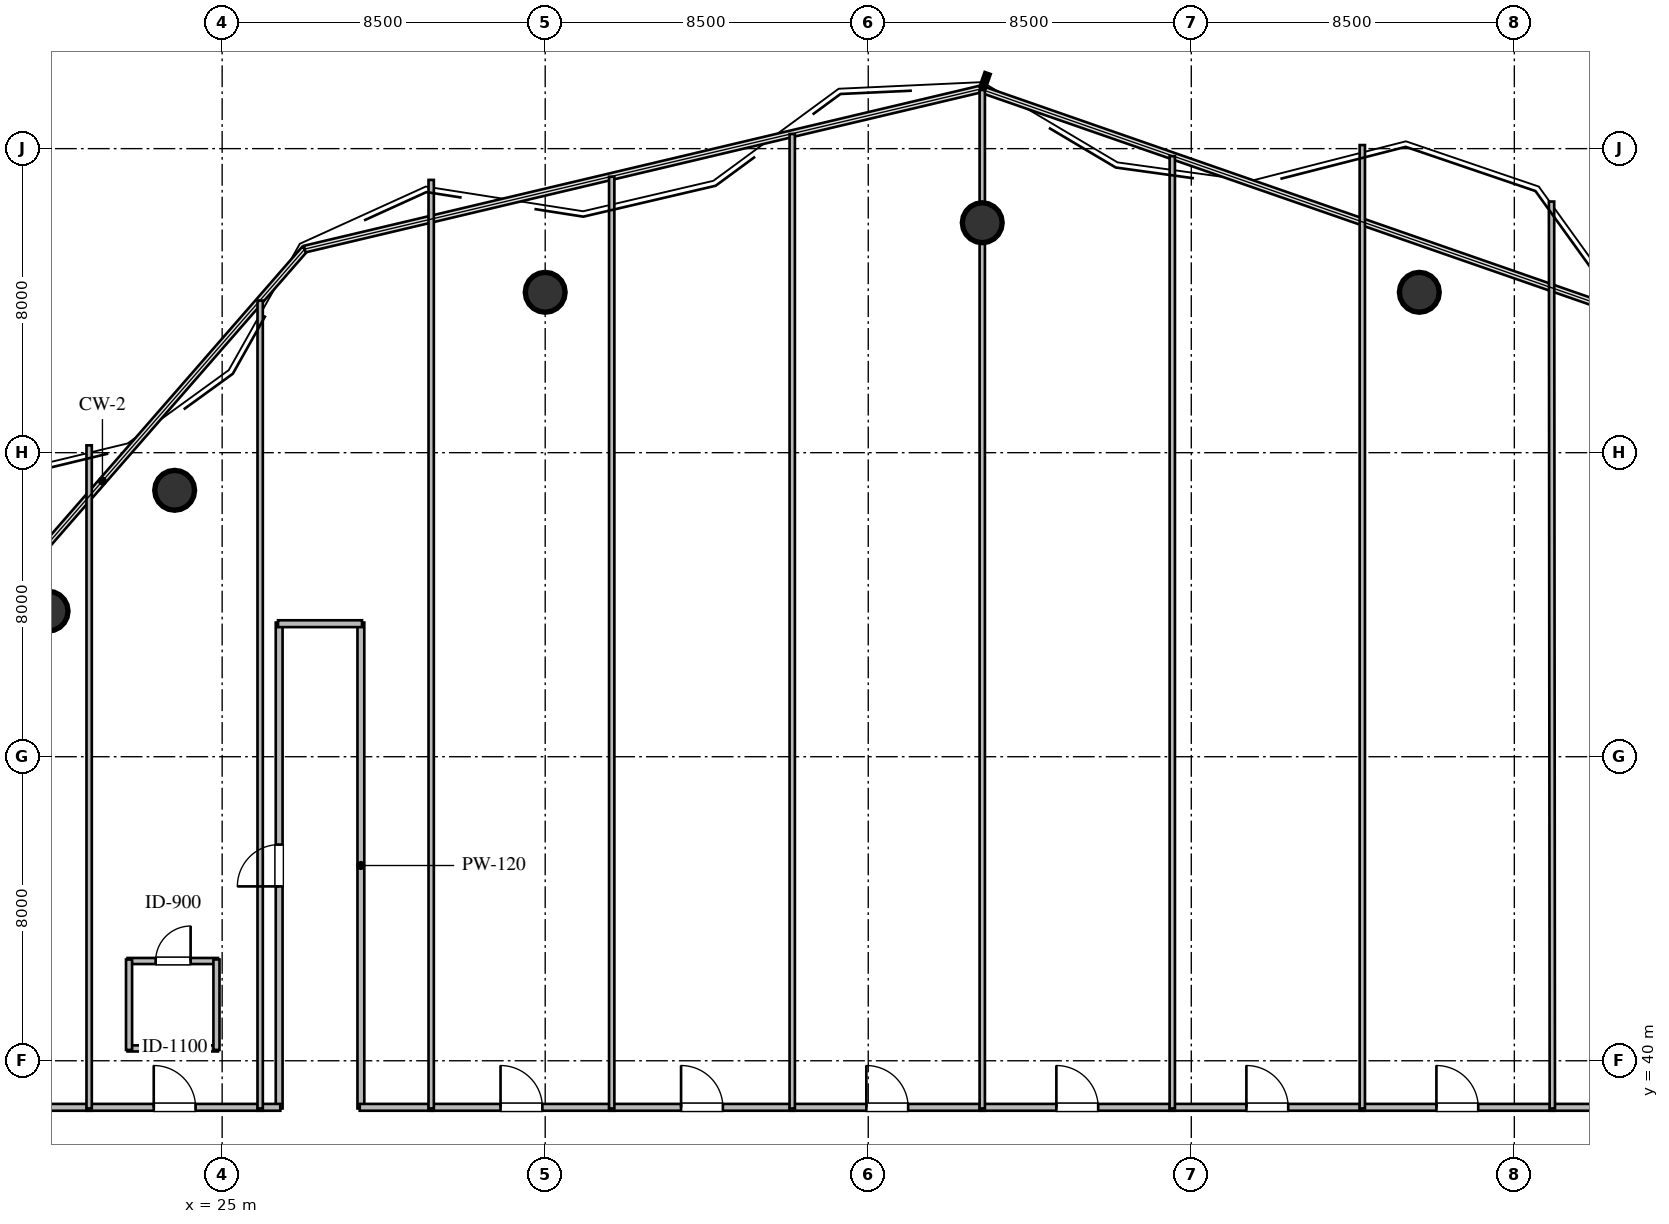
"""IFC4 building model, lengths in metres.
Left out: names, types, materials, properties, quantities, classifications, styles, units other than length and angle.
Written with IfcOpenShell. Run it as: python <this file> out.ifc"""

import sys

from ifc_helpers import new_model, si_unit, direction, frame, frame_2d, origin, origin_2d, place, context, subcontext, project, spatial, rectangle, circle, extrude, element, fill, save


model = new_model("IFC4")
c1 = context("Model", 3, precision=1e-05, world=origin(), true_north=direction((0.0, 1.0)))
c2 = subcontext(c1, "Body", "Model", "MODEL_VIEW")
j1 = project(units=[si_unit("LENGTHUNIT", "METRE"), si_unit("PLANEANGLEUNIT", "RADIAN")], contexts=[c1])
p1 = place(None, origin())
s1 = spatial("IfcSite", under=j1, at=p1, CompositionType="ELEMENT")
p2 = place(p1, origin())
s2 = spatial("IfcBuilding", under=s1, at=p2, CompositionType="ELEMENT")
p3 = place(p2, frame((0.0, 0.0, 249.6)))
s3 = spatial("IfcBuildingStorey", under=s2, at=p3, CompositionType="ELEMENT", Elevation=249.6)
for number, where, z_axis, x_axis in (
    (1, (56.5, 60.22, 0.0), (0.0, 0.0, 1.0), (1.0, 0.0, 0.0)),
    (2, (45.0, 62.05, 0.0), (0.0, 0.0, 1.0), (1.0, 0.0, 0.0)),
    (3, (33.5, 60.22, 0.0), (0.0, 0.0, 1.0), (1.0, 0.0, 0.0)),
    (4, (23.75, 55.01, 0.0), (0.0, 0.0, 1.0), (1.0, 0.0, 0.0)),
    (5, (20.42, 51.83, 0.0), (0.0, 0.0, 1.0), (1.0, 0.0, 0.0)),
):
    element("IfcColumn", number, at=place(p3, frame(where, z_axis=z_axis, x_axis=x_axis)), inside=s3, PredefinedType="COLUMN", context=c2, shape_type="SweptSolid", body=[
        extrude(circle(Radius=0.525, at=origin_2d()), origin(), (0.0, 0.0, 1.0), 3.6),
    ])
p4 = place(p3, frame((22.51, 40.325, 0.0), z_axis=(0.0, 0.0, 1.0), x_axis=(1.0, 0.0, 0.0)))
e6 = element("IfcWall", 6, at=p4, inside=s3, PredefinedType="PLUMBINGWALL", context=c2, shape_type="SweptSolid", body=[
    extrude(rectangle(XDim=2.38, YDim=0.16, at=frame_2d((1.19, 0.0))), origin(), (0.0, 0.0, 1.0), 3.28),
])
p5 = place(p3, frame((22.51, 42.625, 0.0), z_axis=(0.0, 0.0, 1.0), x_axis=(1.0, 0.0, 0.0)))
e7 = element("IfcWall", 7, at=p5, inside=s3, PredefinedType="PLUMBINGWALL", context=c2, shape_type="SweptSolid", body=[
    extrude(rectangle(XDim=2.38, YDim=0.16, at=frame_2d((1.19, 0.0))), origin(), (0.0, 0.0, 1.0), 3.28),
])
p6 = place(p5, frame((0.74, 0.0, 0.0)))
e8 = element("IfcOpeningElement", 8, at=p6, cuts=e7, PredefinedType="OPENING", context=c2, shape_type="SweptSolid", body=[
    extrude(rectangle(XDim=0.92, YDim=2.1, at=frame_2d((0.46, 1.05))), frame((0.0, 0.09, 0.0), z_axis=(0.0, -1.0, 0.0), x_axis=(1.0, 0.0, 0.0)), (0.0, 0.0, 1.0), 0.18),
])
p7 = place(p3, frame((22.55, 40.285, 0.0), z_axis=(0.0, 0.0, 1.0), x_axis=(0.0, 1.0, 0.0)))
e9 = element("IfcWall", 9, at=p7, inside=s3, PredefinedType="PLUMBINGWALL", context=c2, shape_type="SweptSolid", body=[
    extrude(rectangle(XDim=2.38, YDim=0.16, at=frame_2d((1.19, 0.0))), origin(), (0.0, 0.0, 1.0), 2.726),
])
p8 = place(p3, frame((24.85, 40.285, 0.0), z_axis=(0.0, 0.0, 1.0), x_axis=(0.0, 1.0, 0.0)))
e10 = element("IfcWall", 10, at=p8, inside=s3, PredefinedType="PLUMBINGWALL", context=c2, shape_type="SweptSolid", body=[
    extrude(rectangle(XDim=2.38, YDim=0.16, at=frame_2d((1.19, 0.0))), origin(), (0.0, 0.0, 1.0), 3.28),
])
p9 = place(p3, frame((17.405, 38.775, 0.0), z_axis=(0.0, 0.0, 1.0), x_axis=(1.0, 0.0, 0.0)))
e11 = element("IfcWall", 11, at=p9, inside=s3, PredefinedType="PARTITIONING", context=c2, shape_type="SweptSolid", body=[
    extrude(rectangle(XDim=4.16, YDim=0.18, at=frame_2d((2.08, 0.0))), origin(), (0.0, 0.0, 1.0), 3.28),
])
p10 = place(p9, frame((1.53, 0.0, 0.0)))
e12 = element("IfcOpeningElement", 12, at=p10, cuts=e11, PredefinedType="OPENING", context=c2, shape_type="SweptSolid", body=[
    extrude(rectangle(XDim=1.1, YDim=2.1, at=frame_2d((0.55, 1.05))), frame((0.0, 0.1, 0.0), z_axis=(0.0, -1.0, 0.0), x_axis=(1.0, 0.0, 0.0)), (0.0, 0.0, 1.0), 0.2),
])
p11 = place(p3, frame((21.435, 38.775, 0.0), z_axis=(0.0, 0.0, 1.0), x_axis=(1.0, 0.0, 0.0)))
e13 = element("IfcWall", 13, at=p11, inside=s3, PredefinedType="PARTITIONING", context=c2, shape_type="SweptSolid", body=[
    extrude(rectangle(XDim=4.63, YDim=0.18, at=frame_2d((2.315, 0.0))), origin(), (0.0, 0.0, 1.0), 3.28),
])
p12 = place(p11, frame((1.765, 0.0, 0.0)))
e14 = element("IfcOpeningElement", 14, at=p12, cuts=e13, PredefinedType="OPENING", context=c2, shape_type="SweptSolid", body=[
    extrude(rectangle(XDim=1.1, YDim=2.1, at=frame_2d((0.55, 1.05))), frame((0.0, 0.1, 0.0), z_axis=(0.0, -1.0, 0.0), x_axis=(1.0, 0.0, 0.0)), (0.0, 0.0, 1.0), 0.2),
])
p13 = place(p3, frame((26.5, 38.745, 0.0), z_axis=(0.0, 0.0, 1.0), x_axis=(0.0, 1.0, 0.0)))
e15 = element("IfcWall", 15, at=p13, inside=s3, PredefinedType="PARTITIONING", context=c2, shape_type="SweptSolid", body=[
    extrude(rectangle(XDim=12.785, YDim=0.18, at=frame_2d((6.393, 0.0))), origin(), (0.0, 0.0, 1.0), 3.28),
])
p14 = place(p13, frame((5.843, 0.0, 0.0)))
e16 = element("IfcOpeningElement", 16, at=p14, cuts=e15, PredefinedType="OPENING", context=c2, shape_type="SweptSolid", body=[
    extrude(rectangle(XDim=1.1, YDim=2.1, at=frame_2d((0.55, 1.05))), frame((0.0, 0.1, 0.0), z_axis=(0.0, -1.0, 0.0), x_axis=(1.0, 0.0, 0.0)), (0.0, 0.0, 1.0), 0.2),
])
p15 = place(p3, frame((28.65, 51.53, 0.0), z_axis=(0.0, 0.0, 1.0), x_axis=(0.0, -1.0, 0.0)))
e17 = element("IfcWall", 17, at=p15, inside=s3, PredefinedType="PARTITIONING", context=c2, shape_type="SweptSolid", body=[
    extrude(rectangle(XDim=12.785, YDim=0.18, at=frame_2d((6.393, 0.0))), origin(), (0.0, 0.0, 1.0), 3.28),
])
p16 = place(p3, frame((26.47, 51.5, 0.0), z_axis=(0.0, 0.0, 1.0), x_axis=(1.0, 0.0, 0.0)))
e18 = element("IfcWall", 18, at=p16, inside=s3, PredefinedType="PARTITIONING", context=c2, shape_type="SweptSolid", body=[
    extrude(rectangle(XDim=2.21, YDim=0.18, at=frame_2d((1.105, 0.0))), origin(), (0.0, 0.0, 1.0), 3.28),
])
p17 = place(p3, frame((28.62, 38.775, 0.0), z_axis=(0.0, 0.0, 1.0), x_axis=(1.0, 0.0, 0.0)))
e19 = element("IfcWall", 19, at=p17, inside=s3, PredefinedType="PARTITIONING", context=c2, shape_type="SweptSolid", body=[
    extrude(rectangle(XDim=1.945, YDim=0.18, at=frame_2d((0.972, 0.0))), origin(), (0.0, 0.0, 1.0), 3.28),
])
p18 = place(p3, frame((25.935, 38.775, 0.0), z_axis=(0.0, 0.0, 1.0), x_axis=(1.0, 0.0, 0.0)))
e20 = element("IfcWall", 20, at=p18, inside=s3, PredefinedType="PARTITIONING", context=c2, shape_type="SweptSolid", body=[
    extrude(rectangle(XDim=0.595, YDim=0.18, at=frame_2d((0.297, 0.0))), origin(), (0.0, 0.0, 1.0), 3.28),
])
p19 = place(p3, frame((30.435, 38.775, 0.0), z_axis=(0.0, 0.0, 1.0), x_axis=(1.0, 0.0, 0.0)))
e21 = element("IfcWall", 21, at=p19, inside=s3, PredefinedType="PARTITIONING", context=c2, shape_type="SweptSolid", body=[
    extrude(rectangle(XDim=4.88, YDim=0.18, at=frame_2d((2.44, 0.0))), origin(), (0.0, 0.0, 1.0), 3.28),
])
p20 = place(p19, frame((1.89, 0.0, 0.0)))
e22 = element("IfcOpeningElement", 22, at=p20, cuts=e21, PredefinedType="OPENING", context=c2, shape_type="SweptSolid", body=[
    extrude(rectangle(XDim=1.1, YDim=2.1, at=frame_2d((0.55, 1.05))), frame((0.0, 0.1, 0.0), z_axis=(0.0, -1.0, 0.0), x_axis=(1.0, 0.0, 0.0)), (0.0, 0.0, 1.0), 0.2),
])
p21 = place(p3, frame((35.185, 38.775, 0.0), z_axis=(0.0, 0.0, 1.0), x_axis=(1.0, 0.0, 0.0)))
e23 = element("IfcWall", 23, at=p21, inside=s3, PredefinedType="PARTITIONING", context=c2, shape_type="SweptSolid", body=[
    extrude(rectangle(XDim=4.88, YDim=0.18, at=frame_2d((2.44, 0.0))), origin(), (0.0, 0.0, 1.0), 3.28),
])
p22 = place(p21, frame((1.89, 0.0, 0.0)))
e24 = element("IfcOpeningElement", 24, at=p22, cuts=e23, PredefinedType="OPENING", context=c2, shape_type="SweptSolid", body=[
    extrude(rectangle(XDim=1.1, YDim=2.1, at=frame_2d((0.55, 1.05))), frame((0.0, 0.1, 0.0), z_axis=(0.0, -1.0, 0.0), x_axis=(1.0, 0.0, 0.0)), (0.0, 0.0, 1.0), 0.2),
])
p23 = place(p3, frame((39.935, 38.775, 0.0), z_axis=(0.0, 0.0, 1.0), x_axis=(1.0, 0.0, 0.0)))
e25 = element("IfcWall", 25, at=p23, inside=s3, PredefinedType="PARTITIONING", context=c2, shape_type="SweptSolid", body=[
    extrude(rectangle(XDim=5.13, YDim=0.18, at=frame_2d((2.565, 0.0))), origin(), (0.0, 0.0, 1.0), 3.28),
])
p24 = place(p23, frame((2.015, 0.0, 0.0)))
e26 = element("IfcOpeningElement", 26, at=p24, cuts=e25, PredefinedType="OPENING", context=c2, shape_type="SweptSolid", body=[
    extrude(rectangle(XDim=1.1, YDim=2.1, at=frame_2d((0.55, 1.05))), frame((0.0, 0.1, 0.0), z_axis=(0.0, -1.0, 0.0), x_axis=(1.0, 0.0, 0.0)), (0.0, 0.0, 1.0), 0.2),
])
p25 = place(p3, frame((44.935, 38.775, 0.0), z_axis=(0.0, 0.0, 1.0), x_axis=(1.0, 0.0, 0.0)))
e27 = element("IfcWall", 27, at=p25, inside=s3, PredefinedType="PARTITIONING", context=c2, shape_type="SweptSolid", body=[
    extrude(rectangle(XDim=5.13, YDim=0.18, at=frame_2d((2.565, 0.0))), origin(), (0.0, 0.0, 1.0), 3.28),
])
p26 = place(p25, frame((2.015, 0.0, 0.0)))
e28 = element("IfcOpeningElement", 28, at=p26, cuts=e27, PredefinedType="OPENING", context=c2, shape_type="SweptSolid", body=[
    extrude(rectangle(XDim=1.1, YDim=2.1, at=frame_2d((0.55, 1.05))), frame((0.0, 0.1, 0.0), z_axis=(0.0, -1.0, 0.0), x_axis=(1.0, 0.0, 0.0)), (0.0, 0.0, 1.0), 0.2),
])
p27 = place(p3, frame((49.935, 38.775, 0.0), z_axis=(0.0, 0.0, 1.0), x_axis=(1.0, 0.0, 0.0)))
e29 = element("IfcWall", 29, at=p27, inside=s3, PredefinedType="PARTITIONING", context=c2, shape_type="SweptSolid", body=[
    extrude(rectangle(XDim=5.13, YDim=0.18, at=frame_2d((2.565, 0.0))), origin(), (0.0, 0.0, 1.0), 3.28),
])
p28 = place(p27, frame((2.015, 0.0, 0.0)))
e30 = element("IfcOpeningElement", 30, at=p28, cuts=e29, PredefinedType="OPENING", context=c2, shape_type="SweptSolid", body=[
    extrude(rectangle(XDim=1.1, YDim=2.1, at=frame_2d((0.55, 1.05))), frame((0.0, 0.1, 0.0), z_axis=(0.0, -1.0, 0.0), x_axis=(1.0, 0.0, 0.0)), (0.0, 0.0, 1.0), 0.2),
])
p29 = place(p3, frame((54.935, 38.775, 0.0), z_axis=(0.0, 0.0, 1.0), x_axis=(1.0, 0.0, 0.0)))
e31 = element("IfcWall", 31, at=p29, inside=s3, PredefinedType="PARTITIONING", context=c2, shape_type="SweptSolid", body=[
    extrude(rectangle(XDim=5.13, YDim=0.18, at=frame_2d((2.565, 0.0))), origin(), (0.0, 0.0, 1.0), 3.28),
])
p30 = place(p29, frame((2.015, 0.0, 0.0)))
e32 = element("IfcOpeningElement", 32, at=p30, cuts=e31, PredefinedType="OPENING", context=c2, shape_type="SweptSolid", body=[
    extrude(rectangle(XDim=1.1, YDim=2.1, at=frame_2d((0.55, 1.05))), frame((0.0, 0.1, 0.0), z_axis=(0.0, -1.0, 0.0), x_axis=(1.0, 0.0, 0.0)), (0.0, 0.0, 1.0), 0.2),
])
p31 = place(p3, frame((59.935, 38.775, 0.0), z_axis=(0.0, 0.0, 1.0), x_axis=(1.0, 0.0, 0.0)))
e33 = element("IfcWall", 33, at=p31, inside=s3, PredefinedType="PARTITIONING", context=c2, shape_type="SweptSolid", body=[
    extrude(rectangle(XDim=4.595, YDim=0.18, at=frame_2d((2.297, 0.0))), origin(), (0.0, 0.0, 1.0), 3.28),
])
p32 = place(p31, frame((1.747, 0.0, 0.0)))
e34 = element("IfcOpeningElement", 34, at=p32, cuts=e33, PredefinedType="OPENING", context=c2, shape_type="SweptSolid", body=[
    extrude(rectangle(XDim=1.1, YDim=2.1, at=frame_2d((0.55, 1.05))), frame((0.0, 0.1, 0.0), z_axis=(0.0, -1.0, 0.0), x_axis=(1.0, 0.0, 0.0)), (0.0, 0.0, 1.0), 0.2),
])
p33 = place(p3, frame((21.5, 56.193, 0.0), z_axis=(0.0, 0.0, 1.0), x_axis=(0.0, -1.0, 0.0)))
e35 = element("IfcWall", 35, at=p33, inside=s3, PredefinedType="PARTITIONING", context=c2, shape_type="SweptSolid", body=[
    extrude(rectangle(XDim=17.448, YDim=0.14, at=frame_2d((8.724, 0.0))), origin(), (0.0, 0.0, 1.0), 2.726),
])
p34 = place(p3, frame((26.0, 60.003, 0.0), z_axis=(0.0, 0.0, 1.0), x_axis=(0.0, -1.0, 0.0)))
e36 = element("IfcWall", 36, at=p34, inside=s3, PredefinedType="PARTITIONING", context=c2, shape_type="SweptSolid", body=[
    extrude(rectangle(XDim=21.258, YDim=0.14, at=frame_2d((10.629, 0.0))), origin(), (0.0, 0.0, 1.0), 3.28),
])
p35 = place(p3, frame((30.5, 63.177, 0.0), z_axis=(0.0, 0.0, 1.0), x_axis=(0.0, -1.0, 0.0)))
e37 = element("IfcWall", 37, at=p35, inside=s3, PredefinedType="PARTITIONING", context=c2, shape_type="SweptSolid", body=[
    extrude(rectangle(XDim=24.432, YDim=0.14, at=frame_2d((12.216, 0.0))), origin(), (0.0, 0.0, 1.0), 3.28),
])
p36 = place(p3, frame((35.25, 63.26, 0.0), z_axis=(0.0, 0.0, 1.0), x_axis=(0.0, -1.0, 0.0)))
e38 = element("IfcWall", 38, at=p36, inside=s3, PredefinedType="PARTITIONING", context=c2, shape_type="SweptSolid", body=[
    extrude(rectangle(XDim=24.515, YDim=0.14, at=frame_2d((12.257, 0.0))), origin(), (0.0, 0.0, 1.0), 2.726),
])
p37 = place(p3, frame((40.0, 64.385, 0.0), z_axis=(0.0, 0.0, 1.0), x_axis=(0.0, -1.0, 0.0)))
e39 = element("IfcWall", 39, at=p37, inside=s3, PredefinedType="PARTITIONING", context=c2, shape_type="SweptSolid", body=[
    extrude(rectangle(XDim=25.64, YDim=0.14, at=frame_2d((12.82, 0.0))), origin(), (0.0, 0.0, 1.0), 3.28),
])
p38 = place(p3, frame((45.0, 65.542, 0.0), z_axis=(0.0, 0.0, 1.0), x_axis=(0.0, -1.0, 0.0)))
e40 = element("IfcWall", 40, at=p38, inside=s3, PredefinedType="PARTITIONING", context=c2, shape_type="SweptSolid", body=[
    extrude(rectangle(XDim=26.797, YDim=0.14, at=frame_2d((13.398, 0.0))), origin(), (0.0, 0.0, 1.0), 2.726),
])
p39 = place(p3, frame((50.0, 63.802, 0.0), z_axis=(0.0, 0.0, 1.0), x_axis=(0.0, -1.0, 0.0)))
e41 = element("IfcWall", 41, at=p39, inside=s3, PredefinedType="PARTITIONING", context=c2, shape_type="SweptSolid", body=[
    extrude(rectangle(XDim=25.057, YDim=0.14, at=frame_2d((12.529, 0.0))), origin(), (0.0, 0.0, 1.0), 3.28),
])
p40 = place(p3, frame((55.0, 64.094, 0.0), z_axis=(0.0, 0.0, 1.0), x_axis=(0.0, -1.0, 0.0)))
e42 = element("IfcWall", 42, at=p40, inside=s3, PredefinedType="PARTITIONING", context=c2, shape_type="SweptSolid", body=[
    extrude(rectangle(XDim=25.349, YDim=0.14, at=frame_2d((12.674, 0.0))), origin(), (0.0, 0.0, 1.0), 3.28),
])
p41 = place(p3, frame((59.979, 62.608, 0.0), z_axis=(0.0, 0.0, 1.0), x_axis=(0.000879867065, -0.999999612917, 0.0)))
e43 = element("IfcWall", 43, at=p41, inside=s3, PredefinedType="PARTITIONING", context=c2, shape_type="SweptSolid", body=[
    extrude(rectangle(XDim=23.863, YDim=0.14, at=frame_2d((11.931, 0.0))), origin(), (0.0, 0.0, 1.0), 2.916),
])
p42 = place(p6, origin())
e44 = element("IfcDoor", 44, at=p42, inside=s3, OperationType="SINGLE_SWING_RIGHT", PredefinedType="DOOR", context=c2, shape_type="SweptSolid", body=[
    extrude(rectangle(XDim=0.92, YDim=2.1, at=frame_2d((0.46, 1.05))), frame((0.0, 0.025, 0.0), z_axis=(0.0, -1.0, 0.0), x_axis=(1.0, 0.0, 0.0)), (0.0, 0.0, 1.0), 0.05),
])
fill(e8, e44)
p43 = place(p12, origin())
e45 = element("IfcDoor", 45, at=p43, inside=s3, OperationType="SINGLE_SWING_LEFT", PredefinedType="DOOR", context=c2, shape_type="SweptSolid", body=[
    extrude(rectangle(XDim=1.1, YDim=2.1, at=frame_2d((0.55, 1.05))), frame((0.0, 0.025, 0.0), z_axis=(0.0, -1.0, 0.0), x_axis=(1.0, 0.0, 0.0)), (0.0, 0.0, 1.0), 0.05),
])
fill(e14, e45)
p44 = place(p14, origin())
e46 = element("IfcDoor", 46, at=p44, inside=s3, OperationType="SINGLE_SWING_LEFT", PredefinedType="DOOR", context=c2, shape_type="SweptSolid", body=[
    extrude(rectangle(XDim=1.1, YDim=2.1, at=frame_2d((0.55, 1.05))), frame((0.0, 0.025, 0.0), z_axis=(0.0, -1.0, 0.0), x_axis=(1.0, 0.0, 0.0)), (0.0, 0.0, 1.0), 0.05),
])
fill(e16, e46)
p45 = place(p20, origin())
e47 = element("IfcDoor", 47, at=p45, inside=s3, OperationType="SINGLE_SWING_LEFT", PredefinedType="DOOR", context=c2, shape_type="SweptSolid", body=[
    extrude(rectangle(XDim=1.1, YDim=2.1, at=frame_2d((0.55, 1.05))), frame((0.0, 0.025, 0.0), z_axis=(0.0, -1.0, 0.0), x_axis=(1.0, 0.0, 0.0)), (0.0, 0.0, 1.0), 0.05),
])
fill(e22, e47)
p46 = place(p22, origin())
e48 = element("IfcDoor", 48, at=p46, inside=s3, OperationType="SINGLE_SWING_LEFT", PredefinedType="DOOR", context=c2, shape_type="SweptSolid", body=[
    extrude(rectangle(XDim=1.1, YDim=2.1, at=frame_2d((0.55, 1.05))), frame((0.0, 0.025, 0.0), z_axis=(0.0, -1.0, 0.0), x_axis=(1.0, 0.0, 0.0)), (0.0, 0.0, 1.0), 0.05),
])
fill(e24, e48)
p47 = place(p24, origin())
e49 = element("IfcDoor", 49, at=p47, inside=s3, OperationType="SINGLE_SWING_LEFT", PredefinedType="DOOR", context=c2, shape_type="SweptSolid", body=[
    extrude(rectangle(XDim=1.1, YDim=2.1, at=frame_2d((0.55, 1.05))), frame((0.0, 0.025, 0.0), z_axis=(0.0, -1.0, 0.0), x_axis=(1.0, 0.0, 0.0)), (0.0, 0.0, 1.0), 0.05),
])
fill(e26, e49)
p48 = place(p26, origin())
e50 = element("IfcDoor", 50, at=p48, inside=s3, OperationType="SINGLE_SWING_LEFT", PredefinedType="DOOR", context=c2, shape_type="SweptSolid", body=[
    extrude(rectangle(XDim=1.1, YDim=2.1, at=frame_2d((0.55, 1.05))), frame((0.0, 0.025, 0.0), z_axis=(0.0, -1.0, 0.0), x_axis=(1.0, 0.0, 0.0)), (0.0, 0.0, 1.0), 0.05),
])
fill(e28, e50)
p49 = place(p28, origin())
e51 = element("IfcDoor", 51, at=p49, inside=s3, OperationType="SINGLE_SWING_LEFT", PredefinedType="DOOR", context=c2, shape_type="SweptSolid", body=[
    extrude(rectangle(XDim=1.1, YDim=2.1, at=frame_2d((0.55, 1.05))), frame((0.0, 0.025, 0.0), z_axis=(0.0, -1.0, 0.0), x_axis=(1.0, 0.0, 0.0)), (0.0, 0.0, 1.0), 0.05),
])
fill(e30, e51)
p50 = place(p30, origin())
e52 = element("IfcDoor", 52, at=p50, inside=s3, OperationType="SINGLE_SWING_LEFT", PredefinedType="DOOR", context=c2, shape_type="SweptSolid", body=[
    extrude(rectangle(XDim=1.1, YDim=2.1, at=frame_2d((0.55, 1.05))), frame((0.0, 0.025, 0.0), z_axis=(0.0, -1.0, 0.0), x_axis=(1.0, 0.0, 0.0)), (0.0, 0.0, 1.0), 0.05),
])
fill(e32, e52)
save(model, sys.argv[1])
